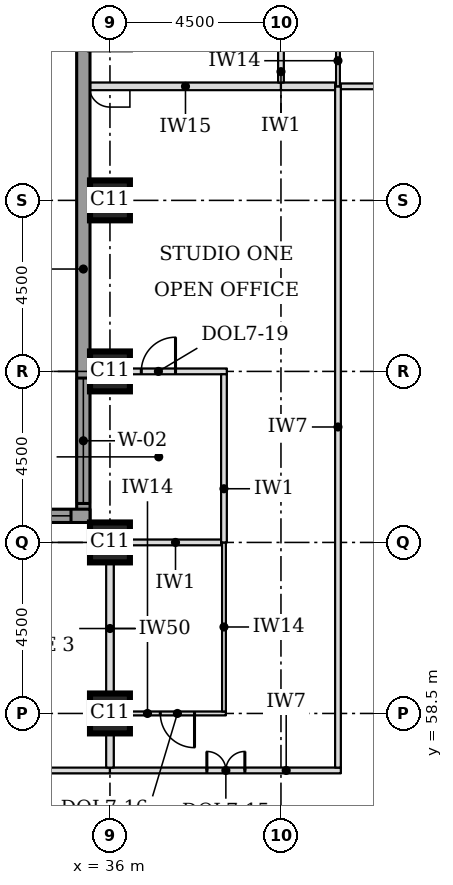
"""IFC4 building model, lengths in metres.
Left out: names, types, materials, properties, quantities, classifications, styles, units other than length and angle.
Written with IfcOpenShell. Run it as: python <this file> out.ifc"""

import sys

from ifc_helpers import new_model, si_unit, direction, frame, frame_2d, origin, origin_2d, place, context, subcontext, project, spatial, rectangle, extrude, element, fill, save


model = new_model("IFC4")
c1 = context("Model", 3, precision=1e-05, world=origin(), true_north=direction((0.0, 1.0)))
c2 = subcontext(c1, "Body", "Model", "MODEL_VIEW")
j1 = project(units=[si_unit("LENGTHUNIT", "METRE"), si_unit("PLANEANGLEUNIT", "RADIAN")], contexts=[c1])
p1 = place(None, origin())
s1 = spatial("IfcSite", under=j1, at=p1, CompositionType="ELEMENT")
p2 = place(p1, origin())
s2 = spatial("IfcBuilding", under=s1, at=p2, CompositionType="ELEMENT")
p3 = place(p2, frame((0.0, 0.0, 130.7)))
s3 = spatial("IfcBuildingStorey", under=s2, at=p3, CompositionType="ELEMENT", Elevation=130.7)
for number, where, z_axis, x_axis in (
    (1, (36.0, 58.5, 0.0), (0.0, 0.0, 1.0), (1.0, 0.0, 0.0)),
    (2, (36.0, 63.0, 0.0), (0.0, 0.0, 1.0), (1.0, 0.0, 0.0)),
    (3, (36.0, 67.5, 0.0), (0.0, 0.0, 1.0), (1.0, 0.0, 0.0)),
    (4, (36.0, 72.0, 0.0), (0.0, 0.0, 1.0), (1.0, 0.0, 0.0)),
):
    element("IfcColumn", number, at=place(p3, frame(where, z_axis=z_axis, x_axis=x_axis)), inside=s3, PredefinedType="COLUMN", context=c2, shape_type="SweptSolid", body=[
        extrude(rectangle(XDim=1.05, YDim=1.05, at=origin_2d()), origin(), (0.0, 0.0, 1.0), 3.7),
    ])
p4 = place(p3, frame((35.3, 76.862, 0.0), z_axis=(0.0, 0.0, 1.0), x_axis=(0.0, -1.0, 0.0)))
e5 = element("IfcWall", 5, at=p4, inside=s3, PredefinedType="STANDARD", context=c2, shape_type="SweptSolid", body=[
    extrude(rectangle(XDim=13.337, YDim=0.35, at=frame_2d((6.669, 0.0))), origin(), (0.0, 0.0, 1.0), 3.525),
])
p5 = place(p4, frame((9.537, 0.0, 0.9)))
e6 = element("IfcOpeningElement", 6, at=p5, cuts=e5, PredefinedType="OPENING", context=c2, shape_type="SweptSolid", body=[
    extrude(rectangle(XDim=3.3, YDim=1.9, at=frame_2d((1.65, 0.95))), frame((0.0, 0.185, 0.0), z_axis=(0.0, -1.0, 0.0), x_axis=(1.0, 0.0, 0.0)), (0.0, 0.0, 1.0), 0.37),
])
p6 = place(p3, frame((35.475, 63.7, 0.0), z_axis=(0.0, 0.0, 1.0), x_axis=(-1.0, 0.0, 0.0)))
e7 = element("IfcWall", 7, at=p6, inside=s3, PredefinedType="STANDARD", context=c2, shape_type="SweptSolid", body=[
    extrude(rectangle(XDim=17.837, YDim=0.35, at=frame_2d((8.919, 0.0))), origin(), (0.0, 0.0, 1.0), 3.525),
])
p7 = place(p6, frame((0.5, 0.0, 0.9)))
e8 = element("IfcOpeningElement", 8, at=p7, cuts=e7, PredefinedType="OPENING", context=c2, shape_type="SweptSolid", body=[
    extrude(rectangle(XDim=3.3, YDim=1.9, at=frame_2d((1.65, 0.95))), frame((0.0, 0.185, 0.0), z_axis=(0.0, -1.0, 0.0), x_axis=(1.0, 0.0, 0.0)), (0.0, 0.0, 1.0), 0.37),
])
p8 = place(p6, frame((9.075, 0.0, 0.9)))
e9 = element("IfcOpeningElement", 9, at=p8, cuts=e7, PredefinedType="OPENING", context=c2, shape_type="SweptSolid", body=[
    extrude(rectangle(XDim=3.3, YDim=1.9, at=frame_2d((1.65, 0.95))), frame((0.0, 0.185, 0.0), z_axis=(0.0, -1.0, 0.0), x_axis=(1.0, 0.0, 0.0)), (0.0, 0.0, 1.0), 0.37),
])
p9 = place(p3, frame((29.38, 57.0, 0.0), z_axis=(0.0, 0.0, 1.0), x_axis=(1.0, 0.0, 0.0)))
e10 = element("IfcWall", 10, at=p9, inside=s3, PredefinedType="PARTITIONING", context=c2, shape_type="SweptSolid", body=[
    extrude(rectangle(XDim=6.62, YDim=0.15, at=frame_2d((3.31, 0.0))), origin(), (0.0, 0.0, 1.0), 3.55),
])
p10 = place(p9, frame((2.88, 0.0, 0.0)))
e11 = element("IfcOpeningElement", 11, at=p10, cuts=e10, PredefinedType="OPENING", context=c2, shape_type="SweptSolid", body=[
    extrude(rectangle(XDim=1.0, YDim=2.1, at=frame_2d((0.5, 1.05))), frame((0.0, 0.085, 0.0), z_axis=(0.0, -1.0, 0.0), x_axis=(1.0, 0.0, 0.0)), (0.0, 0.0, 1.0), 0.17),
])
p11 = place(p3, frame((36.0, 57.0, 0.0), z_axis=(0.0, 0.0, 1.0), x_axis=(1.0, 0.0, 0.0)))
e12 = element("IfcWall", 12, at=p11, inside=s3, PredefinedType="PARTITIONING", context=c2, shape_type="SweptSolid", body=[
    extrude(rectangle(XDim=6.075, YDim=0.15, at=frame_2d((3.038, 0.0))), origin(), (0.0, 0.0, 1.0), 3.55),
])
p12 = place(p11, frame((2.55, 0.0, 0.0)))
e13 = element("IfcOpeningElement", 13, at=p12, cuts=e12, PredefinedType="OPENING", context=c2, shape_type="SweptSolid", body=[
    extrude(rectangle(XDim=1.0, YDim=2.1, at=frame_2d((0.5, 1.05))), frame((0.0, 0.085, 0.0), z_axis=(0.0, -1.0, 0.0), x_axis=(1.0, 0.0, 0.0)), (0.0, 0.0, 1.0), 0.17),
])
p13 = place(p3, frame((36.525, 58.5, 0.0), z_axis=(0.0, 0.0, 1.0), x_axis=(1.0, 0.0, 0.0)))
e14 = element("IfcWall", 14, at=p13, inside=s3, PredefinedType="PARTITIONING", context=c2, shape_type="SweptSolid", body=[
    extrude(rectangle(XDim=2.525, YDim=0.1, at=frame_2d((1.263, 0.0))), origin(), (0.0, 0.0, 1.0), 3.55),
])
p14 = place(p13, frame((0.8, 0.0, 0.0)))
e15 = element("IfcOpeningElement", 15, at=p14, cuts=e14, PredefinedType="OPENING", context=c2, shape_type="SweptSolid", body=[
    extrude(rectangle(XDim=0.9, YDim=2.1, at=frame_2d((0.45, 1.05))), frame((0.0, 0.06, 0.0), z_axis=(0.0, -1.0, 0.0), x_axis=(1.0, 0.0, 0.0)), (0.0, 0.0, 1.0), 0.12),
])
p15 = place(p3, frame((36.525, 63.0, 0.0), z_axis=(0.0, 0.0, 1.0), x_axis=(1.0, 0.0, 0.0)))
e16 = element("IfcWall", 16, at=p15, inside=s3, PredefinedType="PARTITIONING", context=c2, shape_type="SweptSolid", body=[
    extrude(rectangle(XDim=2.4, YDim=0.15, at=frame_2d((1.2, 0.0))), origin(), (0.0, 0.0, 1.0), 3.55),
])
p16 = place(p3, frame((35.475, 67.5, 0.0), z_axis=(0.0, 0.0, 1.0), x_axis=(1.0, 0.0, 0.0)))
e17 = element("IfcWall", 17, at=p16, inside=s3, PredefinedType="PARTITIONING", context=c2, shape_type="SweptSolid", body=[
    extrude(rectangle(XDim=3.6, YDim=0.15, at=frame_2d((1.8, 0.0))), origin(), (0.0, 0.0, 1.0), 3.55),
])
p17 = place(p16, frame((1.35, 0.0, 0.0)))
e18 = element("IfcOpeningElement", 18, at=p17, cuts=e17, PredefinedType="OPENING", context=c2, shape_type="SweptSolid", body=[
    extrude(rectangle(XDim=0.9, YDim=2.1, at=frame_2d((0.45, 1.05))), frame((0.0, 0.085, 0.0), z_axis=(0.0, -1.0, 0.0), x_axis=(1.0, 0.0, 0.0)), (0.0, 0.0, 1.0), 0.17),
])
p18 = place(p3, frame((35.475, 75.0, 0.0), z_axis=(0.0, 0.0, 1.0), x_axis=(1.0, 0.0, 0.0)))
e19 = element("IfcWall", 19, at=p18, inside=s3, PredefinedType="PARTITIONING", context=c2, shape_type="SweptSolid", body=[
    extrude(rectangle(XDim=5.025, YDim=0.2, at=frame_2d((2.512, 0.0))), origin(), (0.0, 0.0, 1.0), 3.55),
])
p19 = place(p3, frame((40.5, 75.0, 0.0), z_axis=(0.0, 0.0, 1.0), x_axis=(1.0, 0.0, 0.0)))
e20 = element("IfcWall", 20, at=p19, inside=s3, PredefinedType="PARTITIONING", context=c2, shape_type="SweptSolid", body=[
    extrude(rectangle(XDim=1.425, YDim=0.2, at=frame_2d((0.712, 0.0))), origin(), (0.0, 0.0, 1.0), 3.55),
])
p20 = place(p3, frame((42.075, 75.0, 0.0), z_axis=(0.0, 0.0, 1.0), x_axis=(1.0, 0.0, 0.0)))
e21 = element("IfcWall", 21, at=p20, inside=s3, PredefinedType="PARTITIONING", context=c2, shape_type="SweptSolid", body=[
    extrude(rectangle(XDim=4.425, YDim=0.15, at=frame_2d((2.212, 0.0))), origin(), (0.0, 0.0, 1.0), 3.55),
])
p21 = place(p20, frame((1.7, 0.0, 0.0)))
e22 = element("IfcOpeningElement", 22, at=p21, cuts=e21, PredefinedType="OPENING", context=c2, shape_type="SweptSolid", body=[
    extrude(rectangle(XDim=1.0, YDim=2.1, at=frame_2d((0.5, 1.05))), frame((0.0, 0.085, 0.0), z_axis=(0.0, -1.0, 0.0), x_axis=(1.0, 0.0, 0.0)), (0.0, 0.0, 1.0), 0.17),
])
p22 = place(p3, frame((36.0, 57.075, 0.0), z_axis=(0.0, 0.0, 1.0), x_axis=(0.0, 1.0, 0.0)))
e23 = element("IfcWall", 23, at=p22, inside=s3, PredefinedType="PARTITIONING", context=c2, shape_type="SweptSolid", body=[
    extrude(rectangle(XDim=0.9, YDim=0.2, at=frame_2d((0.45, 0.0))), origin(), (0.0, 0.0, 1.0), 2.8),
])
p23 = place(p3, frame((42.0, 57.075, 0.0), z_axis=(0.0, 0.0, 1.0), x_axis=(0.0, 1.0, 0.0)))
e24 = element("IfcWall", 24, at=p23, inside=s3, PredefinedType="PARTITIONING", context=c2, shape_type="SweptSolid", body=[
    extrude(rectangle(XDim=17.925, YDim=0.15, at=frame_2d((8.962, 0.0))), origin(), (0.0, 0.0, 1.0), 3.55),
])
p24 = place(p3, frame((39.0, 58.55, 0.0), z_axis=(0.0, 0.0, 1.0), x_axis=(0.0, 1.0, 0.0)))
e25 = element("IfcWall", 25, at=p24, inside=s3, PredefinedType="PARTITIONING", context=c2, shape_type="SweptSolid", body=[
    extrude(rectangle(XDim=4.45, YDim=0.1, at=frame_2d((2.225, 0.0))), origin(), (0.0, 0.0, 1.0), 3.55),
])
p25 = place(p3, frame((36.0, 58.995, 0.0), z_axis=(0.0, 0.0, 1.0), x_axis=(0.0, 1.0, 0.0)))
e26 = element("IfcWall", 26, at=p25, inside=s3, PredefinedType="PARTITIONING", context=c2, shape_type="SweptSolid", body=[
    extrude(rectangle(XDim=3.48, YDim=0.2, at=frame_2d((1.74, 0.0))), origin(), (0.0, 0.0, 1.0), 2.8),
])
p26 = place(p3, frame((39.0, 63.0, 0.0), z_axis=(0.0, 0.0, 1.0), x_axis=(0.0, 1.0, 0.0)))
e27 = element("IfcWall", 27, at=p26, inside=s3, PredefinedType="PARTITIONING", context=c2, shape_type="SweptSolid", body=[
    extrude(rectangle(XDim=4.425, YDim=0.15, at=frame_2d((2.212, 0.0))), origin(), (0.0, 0.0, 1.0), 3.55),
])
p27 = place(p3, frame((42.0, 75.0, 0.0), z_axis=(0.0, 0.0, 1.0), x_axis=(0.0, 1.0, 0.0)))
e28 = element("IfcWall", 28, at=p27, inside=s3, PredefinedType="PARTITIONING", context=c2, shape_type="SweptSolid", body=[
    extrude(rectangle(XDim=2.95, YDim=0.1, at=frame_2d((1.475, 0.0))), origin(), (0.0, 0.0, 1.0), 3.55),
])
p28 = place(p3, frame((40.5, 75.1, 0.0), z_axis=(0.0, 0.0, 1.0), x_axis=(0.0, 1.0, 0.0)))
e29 = element("IfcWall", 29, at=p28, inside=s3, PredefinedType="PARTITIONING", context=c2, shape_type="SweptSolid", body=[
    extrude(rectangle(XDim=5.375, YDim=0.15, at=frame_2d((2.688, 0.0))), origin(), (0.0, 0.0, 1.0), 3.55),
])
p29 = place(p28, frame((2.25, 0.0, 0.0)))
e30 = element("IfcOpeningElement", 30, at=p29, cuts=e29, PredefinedType="OPENING", context=c2, shape_type="SweptSolid", body=[
    extrude(rectangle(XDim=0.9, YDim=2.1, at=frame_2d((0.45, 1.05))), frame((0.0, 0.085, 0.0), z_axis=(0.0, -1.0, 0.0), x_axis=(1.0, 0.0, 0.0)), (0.0, 0.0, 1.0), 0.17),
])
p30 = place(p5, origin())
e31 = element("IfcWindow", 31, at=p30, inside=s3, PartitioningType="SINGLE_PANEL", PredefinedType="WINDOW", context=c2, shape_type="SweptSolid", body=[
    extrude(rectangle(XDim=3.3, YDim=1.9, at=frame_2d((1.65, 0.95))), frame((0.0, 0.085, 0.0), z_axis=(0.0, -1.0, 0.0), x_axis=(1.0, 0.0, 0.0)), (0.0, 0.0, 1.0), 0.06),
])
fill(e6, e31)
p31 = place(p7, origin())
e32 = element("IfcWindow", 32, at=p31, inside=s3, PartitioningType="SINGLE_PANEL", PredefinedType="WINDOW", context=c2, shape_type="SweptSolid", body=[
    extrude(rectangle(XDim=3.3, YDim=1.9, at=frame_2d((1.65, 0.95))), frame((0.0, 0.085, 0.0), z_axis=(0.0, -1.0, 0.0), x_axis=(1.0, 0.0, 0.0)), (0.0, 0.0, 1.0), 0.06),
])
fill(e8, e32)
p32 = place(p12, origin())
e33 = element("IfcDoor", 33, at=p32, inside=s3, OperationType="DOUBLE_DOOR_SINGLE_SWING", PredefinedType="DOOR", context=c2, shape_type="SweptSolid", body=[
    extrude(rectangle(XDim=1.0, YDim=2.1, at=frame_2d((0.5, 1.05))), frame((0.0, 0.025, 0.0), z_axis=(0.0, -1.0, 0.0), x_axis=(1.0, 0.0, 0.0)), (0.0, 0.0, 1.0), 0.05),
])
fill(e13, e33)
p33 = place(p14, frame((0.9, 0.0, 0.0), z_axis=(0.0, 0.0, 1.0), x_axis=(-1.0, 0.0, 0.0)))
e34 = element("IfcDoor", 34, at=p33, inside=s3, OperationType="SINGLE_SWING_LEFT", PredefinedType="DOOR", context=c2, shape_type="SweptSolid", body=[
    extrude(rectangle(XDim=0.9, YDim=2.1, at=frame_2d((0.45, 1.05))), frame((0.0, 0.025, 0.0), z_axis=(0.0, -1.0, 0.0), x_axis=(1.0, 0.0, 0.0)), (0.0, 0.0, 1.0), 0.05),
])
fill(e15, e34)
p34 = place(p17, origin())
e35 = element("IfcDoor", 35, at=p34, inside=s3, OperationType="SINGLE_SWING_RIGHT", PredefinedType="DOOR", context=c2, shape_type="SweptSolid", body=[
    extrude(rectangle(XDim=0.9, YDim=2.1, at=frame_2d((0.45, 1.05))), frame((0.0, 0.025, 0.0), z_axis=(0.0, -1.0, 0.0), x_axis=(1.0, 0.0, 0.0)), (0.0, 0.0, 1.0), 0.05),
])
fill(e18, e35)
save(model, sys.argv[1])
